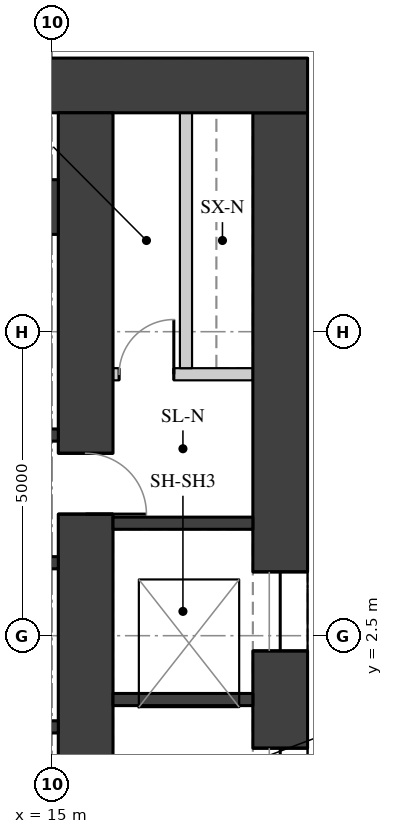
"""IFC4 building model, lengths in metres.
Left out: names, types, materials, properties, quantities, classifications, styles, units other than length and angle.
Written with IfcOpenShell. Run it as: python <this file> out.ifc"""

import sys

from ifc_helpers import new_model, si_unit, direction, frame, frame_2d, origin, place, context, subcontext, project, spatial, rectangle, extrude, element, fill, save


model = new_model("IFC4")
c1 = context("Model", 3, precision=1e-05, world=origin(), true_north=direction((0.0, 1.0)))
c2 = subcontext(c1, "Body", "Model", "MODEL_VIEW")
j1 = project(units=[si_unit("LENGTHUNIT", "METRE"), si_unit("PLANEANGLEUNIT", "RADIAN")], contexts=[c1])
p1 = place(None, origin())
s1 = spatial("IfcSite", under=j1, at=p1, CompositionType="ELEMENT")
p2 = place(p1, origin())
s2 = spatial("IfcBuilding", under=s1, at=p2, CompositionType="ELEMENT")
p3 = place(p2, frame((0.0, 0.0, 139.6)))
s3 = spatial("IfcBuildingStorey", under=s2, at=p3, CompositionType="ELEMENT", Elevation=139.6)
p4 = place(p3, frame((18.75, -11.1, 0.0), z_axis=(0.0, 0.0, 1.0), x_axis=(0.0, 1.0, 0.0)))
e1 = element("IfcWall", 1, at=p4, inside=s3, PredefinedType="SHEAR", context=c2, shape_type="SweptSolid", body=[
    extrude(rectangle(XDim=22.2, YDim=0.9, at=frame_2d((11.1, 0.0))), origin(), (0.0, 0.0, 1.0), 5.22),
])
p5 = place(p4, frame((7.55, 0.0, 0.0)))
e2 = element("IfcOpeningElement", 2, at=p5, cuts=e1, PredefinedType="OPENING", context=c2, shape_type="SweptSolid", body=[
    extrude(rectangle(XDim=1.3, YDim=2.1, at=frame_2d((0.65, 1.05))), frame((0.0, 0.46, 0.0), z_axis=(0.0, -1.0, 0.0), x_axis=(1.0, 0.0, 0.0)), (0.0, 0.0, 1.0), 0.92),
])
p6 = place(p4, frame((10.45, 0.0, 0.0)))
e3 = element("IfcOpeningElement", 3, at=p6, cuts=e1, PredefinedType="OPENING", context=c2, shape_type="SweptSolid", body=[
    extrude(rectangle(XDim=1.3, YDim=2.1, at=frame_2d((0.65, 1.05))), frame((0.0, 0.46, 0.0), z_axis=(0.0, -1.0, 0.0), x_axis=(1.0, 0.0, 0.0)), (0.0, 0.0, 1.0), 0.92),
])
p7 = place(p4, frame((13.35, 0.0, 0.0)))
e4 = element("IfcOpeningElement", 4, at=p7, cuts=e1, PredefinedType="OPENING", context=c2, shape_type="SweptSolid", body=[
    extrude(rectangle(XDim=1.3, YDim=2.1, at=frame_2d((0.65, 1.05))), frame((0.0, 0.46, 0.0), z_axis=(0.0, -1.0, 0.0), x_axis=(1.0, 0.0, 0.0)), (0.0, 0.0, 1.0), 0.92),
])
p8 = place(p3, frame((4.0, 11.55, 0.0), z_axis=(0.0, 0.0, 1.0), x_axis=(1.0, 0.0, 0.0)))
e5 = element("IfcWall", 5, at=p8, inside=s3, PredefinedType="SHEAR", context=c2, shape_type="SweptSolid", body=[
    extrude(rectangle(XDim=15.2, YDim=0.9, at=frame_2d((7.6, 0.0))), origin(), (0.0, 0.0, 1.0), 5.22),
])
p9 = place(p3, frame((15.55, -11.1, 0.0), z_axis=(0.0, 0.0, 1.0), x_axis=(0.0, 1.0, 0.0)))
e6 = element("IfcWall", 6, at=p9, inside=s3, PredefinedType="SHEAR", context=c2, shape_type="SweptSolid", body=[
    extrude(rectangle(XDim=22.2, YDim=0.9, at=frame_2d((11.1, 0.0))), origin(), (0.0, 0.0, 1.0), 5.22),
])
p10 = place(p9, frame((15.6, 0.0, 0.0)))
e7 = element("IfcOpeningElement", 7, at=p10, cuts=e6, PredefinedType="OPENING", context=c2, shape_type="SweptSolid", body=[
    extrude(rectangle(XDim=1.0, YDim=2.1, at=frame_2d((0.5, 1.05))), frame((0.0, 0.46, 0.0), z_axis=(0.0, -1.0, 0.0), x_axis=(1.0, 0.0, 0.0)), (0.0, 0.0, 1.0), 0.92),
])
p11 = place(p9, frame((5.6, 0.0, 0.0)))
e8 = element("IfcOpeningElement", 8, at=p11, cuts=e6, PredefinedType="OPENING", context=c2, shape_type="SweptSolid", body=[
    extrude(rectangle(XDim=1.0, YDim=2.1, at=frame_2d((0.5, 1.05))), frame((0.0, 0.46, 0.0), z_axis=(0.0, -1.0, 0.0), x_axis=(1.0, 0.0, 0.0)), (0.0, 0.0, 1.0), 0.92),
])
p12 = place(p3, frame((4.9, 9.55, 0.0), z_axis=(0.0, 0.0, 1.0), x_axis=(1.0, 0.0, 0.0)))
e9 = element("IfcWall", 9, at=p12, inside=s3, PredefinedType="SHEAR", context=c2, shape_type="SweptSolid", body=[
    extrude(rectangle(XDim=10.2, YDim=0.9, at=frame_2d((5.1, 0.0))), origin(), (0.0, 0.0, 1.0), 5.22),
])
p13 = place(p3, frame((4.9, 5.8, 0.0), z_axis=(0.0, 0.0, 1.0), x_axis=(1.0, 0.0, 0.0)))
e10 = element("IfcWall", 10, at=p13, inside=s3, PredefinedType="SHEAR", context=c2, shape_type="SweptSolid", body=[
    extrude(rectangle(XDim=10.2, YDim=0.2, at=frame_2d((5.1, 0.0))), origin(), (0.0, 0.0, 1.0), 5.22),
])
p14 = place(p13, frame((6.75, 0.0, 0.0)))
e11 = element("IfcOpeningElement", 11, at=p14, cuts=e10, PredefinedType="OPENING", context=c2, shape_type="SweptSolid", body=[
    extrude(rectangle(XDim=1.1, YDim=2.1, at=frame_2d((0.55, 1.05))), frame((0.0, 0.11, 0.0), z_axis=(0.0, -1.0, 0.0), x_axis=(1.0, 0.0, 0.0)), (0.0, 0.0, 1.0), 0.22),
])
p15 = place(p13, frame((8.75, 0.0, 0.0)))
e12 = element("IfcOpeningElement", 12, at=p15, cuts=e10, PredefinedType="OPENING", context=c2, shape_type="SweptSolid", body=[
    extrude(rectangle(XDim=1.1, YDim=2.1, at=frame_2d((0.55, 1.05))), frame((0.0, 0.11, 0.0), z_axis=(0.0, -1.0, 0.0), x_axis=(1.0, 0.0, 0.0)), (0.0, 0.0, 1.0), 0.22),
])
p16 = place(p3, frame((4.9, 3.7, 0.0), z_axis=(0.0, 0.0, 1.0), x_axis=(1.0, 0.0, 0.0)))
e13 = element("IfcWall", 13, at=p16, inside=s3, PredefinedType="SHEAR", context=c2, shape_type="SweptSolid", body=[
    extrude(rectangle(XDim=10.2, YDim=0.2, at=frame_2d((5.1, 0.0))), origin(), (0.0, 0.0, 1.0), 5.22),
])
p17 = place(p16, frame((6.3, 0.0, 0.0)))
e14 = element("IfcOpeningElement", 14, at=p17, cuts=e13, PredefinedType="OPENING", context=c2, shape_type="SweptSolid", body=[
    extrude(rectangle(XDim=1.1, YDim=2.1, at=frame_2d((0.55, 1.05))), frame((0.0, 0.11, 0.0), z_axis=(0.0, -1.0, 0.0), x_axis=(1.0, 0.0, 0.0)), (0.0, 0.0, 1.0), 0.22),
])
p18 = place(p16, frame((8.6, 0.0, 0.0)))
e15 = element("IfcOpeningElement", 15, at=p18, cuts=e13, PredefinedType="OPENING", context=c2, shape_type="SweptSolid", body=[
    extrude(rectangle(XDim=1.1, YDim=2.1, at=frame_2d((0.55, 1.05))), frame((0.0, 0.11, 0.0), z_axis=(0.0, -1.0, 0.0), x_axis=(1.0, 0.0, 0.0)), (0.0, 0.0, 1.0), 0.22),
])
p19 = place(p3, frame((4.9, 1.0, 0.0), z_axis=(0.0, 0.0, 1.0), x_axis=(1.0, 0.0, 0.0)))
e16 = element("IfcWall", 16, at=p19, inside=s3, PredefinedType="SHEAR", context=c2, shape_type="SweptSolid", body=[
    extrude(rectangle(XDim=10.2, YDim=0.2, at=frame_2d((5.1, 0.0))), origin(), (0.0, 0.0, 1.0), 5.22),
])
for number, where, z_axis, x_axis in (
    (17, (16.0, 1.45, 0.0), (0.0, 0.0, 1.0), (1.0, 0.0, 0.0)),
    (18, (16.0, 4.35, 0.0), (0.0, 0.0, 1.0), (1.0, 0.0, 0.0)),
):
    element("IfcWall", number, at=place(p3, frame(where, z_axis=z_axis, x_axis=x_axis)), inside=s3, PredefinedType="SHEAR", context=c2, shape_type="SweptSolid", body=[
        extrude(rectangle(XDim=2.3, YDim=0.2, at=frame_2d((1.15, 0.0))), origin(), (0.0, 0.0, 1.0), 5.22),
    ])
p20 = place(p3, frame((16.0, 6.8, 0.0), z_axis=(0.0, 0.0, 1.0), x_axis=(1.0, 0.0, 0.0)))
e19 = element("IfcWall", 19, at=p20, inside=s3, PredefinedType="PARTITIONING", context=c2, shape_type="SweptSolid", body=[
    extrude(rectangle(XDim=2.3, YDim=0.2, at=frame_2d((1.15, 0.0))), origin(), (0.0, 0.0, 1.0), 5.22),
])
p21 = place(p20, frame((0.1, 0.0, 0.0)))
e20 = element("IfcOpeningElement", 20, at=p21, cuts=e19, PredefinedType="OPENING", context=c2, shape_type="SweptSolid", body=[
    extrude(rectangle(XDim=0.9, YDim=2.1, at=frame_2d((0.45, 1.05))), frame((0.0, 0.11, 0.0), z_axis=(0.0, -1.0, 0.0), x_axis=(1.0, 0.0, 0.0)), (0.0, 0.0, 1.0), 0.22),
])
p22 = place(p3, frame((17.2, 6.9, 0.0), z_axis=(0.0, 0.0, 1.0), x_axis=(0.0, 1.0, 0.0)))
e21 = element("IfcWall", 21, at=p22, inside=s3, PredefinedType="PARTITIONING", context=c2, shape_type="SweptSolid", body=[
    extrude(rectangle(XDim=4.2, YDim=0.2, at=frame_2d((2.1, 0.0))), origin(), (0.0, 0.0, 1.0), 5.22),
])
p23 = place(p6, origin())
e22 = element("IfcDoor", 22, at=p23, inside=s3, OperationType="DOUBLE_DOOR_SLIDING", PredefinedType="DOOR", context=c2, shape_type="SweptSolid", body=[
    extrude(rectangle(XDim=1.3, YDim=2.1, at=frame_2d((0.65, 1.05))), frame((0.0, 0.025, 0.0), z_axis=(0.0, -1.0, 0.0), x_axis=(1.0, 0.0, 0.0)), (0.0, 0.0, 1.0), 0.05),
])
fill(e3, e22)
p24 = place(p7, origin())
e23 = element("IfcDoor", 23, at=p24, inside=s3, OperationType="DOUBLE_DOOR_SLIDING", PredefinedType="DOOR", context=c2, shape_type="SweptSolid", body=[
    extrude(rectangle(XDim=1.3, YDim=2.1, at=frame_2d((0.65, 1.05))), frame((0.0, 0.025, 0.0), z_axis=(0.0, -1.0, 0.0), x_axis=(1.0, 0.0, 0.0)), (0.0, 0.0, 1.0), 0.05),
])
fill(e4, e23)
p25 = place(p10, origin())
e24 = element("IfcDoor", 24, at=p25, inside=s3, OperationType="SINGLE_SWING_RIGHT", PredefinedType="DOOR", context=c2, shape_type="SweptSolid", body=[
    extrude(rectangle(XDim=1.0, YDim=2.1, at=frame_2d((0.5, 1.05))), frame((0.0, 0.025, 0.0), z_axis=(0.0, -1.0, 0.0), x_axis=(1.0, 0.0, 0.0)), (0.0, 0.0, 1.0), 0.05),
])
fill(e7, e24)
p26 = place(p21, origin())
e25 = element("IfcDoor", 25, at=p26, inside=s3, OperationType="SINGLE_SWING_RIGHT", PredefinedType="DOOR", context=c2, shape_type="SweptSolid", body=[
    extrude(rectangle(XDim=0.9, YDim=2.1, at=frame_2d((0.45, 1.05))), frame((0.0, 0.025, 0.0), z_axis=(0.0, -1.0, 0.0), x_axis=(1.0, 0.0, 0.0)), (0.0, 0.0, 1.0), 0.05),
])
fill(e20, e25)
save(model, sys.argv[1])
